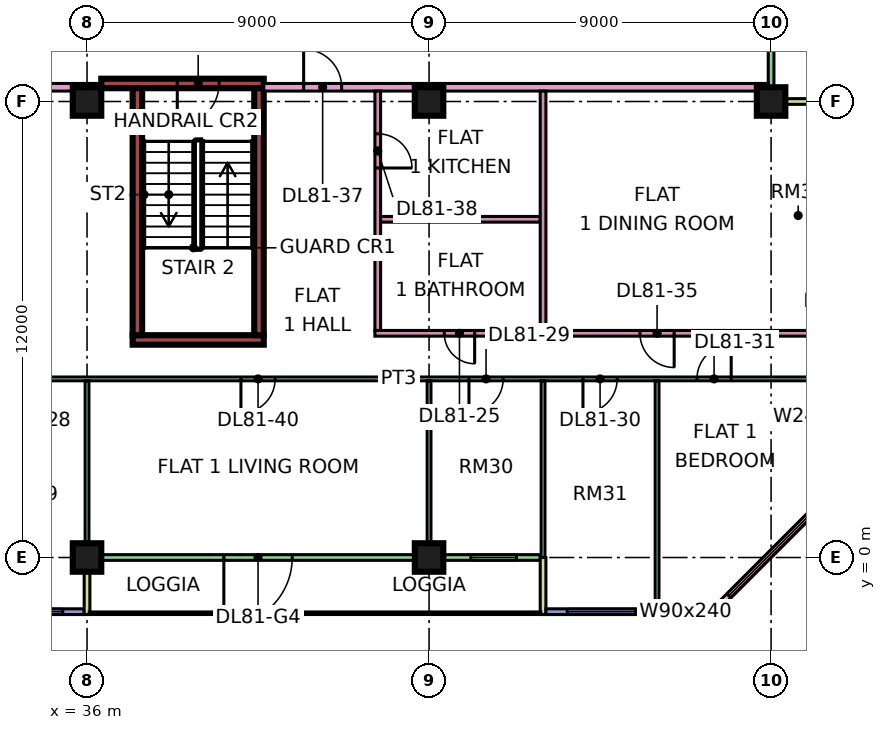
"""IFC4 building model, lengths in metres.
Left out: names, types, materials, properties, quantities, classifications, styles, units other than length and angle.
Written with IfcOpenShell. Run it as: python <this file> out.ifc"""

import sys

from ifc_helpers import new_model, si_unit, direction, frame, frame_2d, origin, origin_2d, place, context, subcontext, project, spatial, rectangle, extrude, element, fill, save


model = new_model("IFC4")
c1 = context("Model", 3, precision=1e-05, world=origin(), true_north=direction((0.0, 1.0)))
c2 = subcontext(c1, "Body", "Model", "MODEL_VIEW")
j1 = project(units=[si_unit("LENGTHUNIT", "METRE"), si_unit("PLANEANGLEUNIT", "RADIAN")], contexts=[c1])
p1 = place(None, origin())
s1 = spatial("IfcSite", under=j1, at=p1, CompositionType="ELEMENT")
p2 = place(p1, origin())
s2 = spatial("IfcBuilding", under=s1, at=p2, CompositionType="ELEMENT")
p3 = place(p2, frame((0.0, 0.0, 350.15)))
s3 = spatial("IfcBuildingStorey", under=s2, at=p3, CompositionType="ELEMENT", Elevation=350.15)
for number, where, z_axis, x_axis in (
    (1, (36.0, 0.0, 0.0), (0.0, 0.0, 1.0), (1.0, 0.0, 0.0)),
    (2, (36.0, 12.0, 0.0), (0.0, 0.0, 1.0), (1.0, 0.0, 0.0)),
    (3, (45.0, 0.0, 0.0), (0.0, 0.0, 1.0), (1.0, 0.0, 0.0)),
    (4, (45.0, 12.0, 0.0), (0.0, 0.0, 1.0), (1.0, 0.0, 0.0)),
    (5, (54.0, 12.0, 0.0), (0.0, 0.0, 1.0), (1.0, 0.0, 0.0)),
):
    element("IfcColumn", number, at=place(p3, frame(where, z_axis=z_axis, x_axis=x_axis)), inside=s3, PredefinedType="COLUMN", context=c2, shape_type="SweptSolid", body=[
        extrude(rectangle(XDim=0.75, YDim=0.75, at=origin_2d()), origin(), (0.0, 0.0, 1.0), 3.75),
    ])
p4 = place(p3, frame((37.2, 5.725, 0.0), z_axis=(0.0, 0.0, 1.0), x_axis=(1.0, 0.0, 0.0)))
e6 = element("IfcWall", 6, at=p4, inside=s3, PredefinedType="SHEAR", context=c2, shape_type="SweptSolid", body=[
    extrude(rectangle(XDim=3.45, YDim=0.25, at=frame_2d((1.725, 0.0))), origin(), (0.0, 0.0, 1.0), 3.75),
])
p5 = place(p3, frame((36.375, 12.475, 0.0), z_axis=(0.0, 0.0, 1.0), x_axis=(1.0, 0.0, 0.0)))
e7 = element("IfcWall", 7, at=p5, inside=s3, PredefinedType="SHEAR", context=c2, shape_type="SweptSolid", body=[
    extrude(rectangle(XDim=4.275, YDim=0.25, at=frame_2d((2.137, 0.0))), origin(), (0.0, 0.0, 1.0), 3.75),
])
p6 = place(p5, frame((2.0, 0.0, 0.0)))
e8 = element("IfcOpeningElement", 8, at=p6, cuts=e7, PredefinedType="OPENING", context=c2, shape_type="SweptSolid", body=[
    extrude(rectangle(XDim=1.1, YDim=2.2, at=frame_2d((0.55, 1.1))), frame((0.0, 0.135, 0.0), z_axis=(0.0, -1.0, 0.0), x_axis=(1.0, 0.0, 0.0)), (0.0, 0.0, 1.0), 0.27),
])
for number, where, z_axis, x_axis in (
    (9, (37.325, 5.85, 0.0), (0.0, 0.0, 1.0), (0.0, 1.0, 0.0)),
    (10, (40.525, 5.85, 0.0), (0.0, 0.0, 1.0), (0.0, 1.0, 0.0)),
):
    element("IfcWall", number, at=place(p3, frame(where, z_axis=z_axis, x_axis=x_axis)), inside=s3, PredefinedType="SHEAR", context=c2, shape_type="SweptSolid", body=[
        extrude(rectangle(XDim=6.5, YDim=0.25, at=frame_2d((3.25, 0.0))), origin(), (0.0, 0.0, 1.0), 3.75),
    ])
p7 = place(p3, frame((24.075, -1.425, 0.0), z_axis=(0.0, 0.0, 1.0), x_axis=(1.0, 0.0, 0.0)))
e11 = element("IfcWall", 11, at=p7, inside=s3, PredefinedType="SOLIDWALL", context=c2, shape_type="SweptSolid", body=[
    extrude(rectangle(XDim=11.85, YDim=0.15, at=frame_2d((5.925, 0.0))), origin(), (0.0, 0.0, 1.0), 3.35),
])
p8 = place(p7, frame((0.562, 0.0, 0.45)))
e12 = element("IfcOpeningElement", 12, at=p8, cuts=e11, PredefinedType="OPENING", context=c2, shape_type="SweptSolid", body=[
    extrude(rectangle(XDim=1.8, YDim=2.4, at=frame_2d((0.9, 1.2))), frame((0.0, 0.085, 0.0), z_axis=(0.0, -1.0, 0.0), x_axis=(1.0, 0.0, 0.0)), (0.0, 0.0, 1.0), 0.17),
])
p9 = place(p7, frame((3.525, 0.0, 0.45)))
e13 = element("IfcOpeningElement", 13, at=p9, cuts=e11, PredefinedType="OPENING", context=c2, shape_type="SweptSolid", body=[
    extrude(rectangle(XDim=1.8, YDim=2.4, at=frame_2d((0.9, 1.2))), frame((0.0, 0.085, 0.0), z_axis=(0.0, -1.0, 0.0), x_axis=(1.0, 0.0, 0.0)), (0.0, 0.0, 1.0), 0.17),
])
p10 = place(p7, frame((6.525, 0.0, 0.45)))
e14 = element("IfcOpeningElement", 14, at=p10, cuts=e11, PredefinedType="OPENING", context=c2, shape_type="SweptSolid", body=[
    extrude(rectangle(XDim=1.8, YDim=2.4, at=frame_2d((0.9, 1.2))), frame((0.0, 0.085, 0.0), z_axis=(0.0, -1.0, 0.0), x_axis=(1.0, 0.0, 0.0)), (0.0, 0.0, 1.0), 0.17),
])
p11 = place(p7, frame((9.488, 0.0, 0.45)))
e15 = element("IfcOpeningElement", 15, at=p11, cuts=e11, PredefinedType="OPENING", context=c2, shape_type="SweptSolid", body=[
    extrude(rectangle(XDim=1.8, YDim=2.4, at=frame_2d((0.9, 1.2))), frame((0.0, 0.085, 0.0), z_axis=(0.0, -1.0, 0.0), x_axis=(1.0, 0.0, 0.0)), (0.0, 0.0, 1.0), 0.17),
])
p12 = place(p3, frame((36.075, 0.0, 0.0), z_axis=(0.0, 0.0, 1.0), x_axis=(1.0, 0.0, 0.0)))
e16 = element("IfcWall", 16, at=p12, inside=s3, PredefinedType="SOLIDWALL", context=c2, shape_type="SweptSolid", body=[
    extrude(rectangle(XDim=11.85, YDim=0.15, at=frame_2d((5.925, 0.0))), origin(), (0.0, 0.0, 1.0), 3.35),
])
p13 = place(p12, frame((3.525, 0.0, 0.0)))
e17 = element("IfcOpeningElement", 17, at=p13, cuts=e16, PredefinedType="OPENING", context=c2, shape_type="SweptSolid", body=[
    extrude(rectangle(XDim=1.8, YDim=2.4, at=frame_2d((0.9, 1.2))), frame((0.0, 0.085, 0.0), z_axis=(0.0, -1.0, 0.0), x_axis=(1.0, 0.0, 0.0)), (0.0, 0.0, 1.0), 0.17),
])
p14 = place(p12, frame((10.025, 0.0, 0.45)))
e18 = element("IfcOpeningElement", 18, at=p14, cuts=e16, PredefinedType="OPENING", context=c2, shape_type="SweptSolid", body=[
    extrude(rectangle(XDim=1.2, YDim=2.4, at=frame_2d((0.6, 1.2))), frame((0.0, 0.085, 0.0), z_axis=(0.0, -1.0, 0.0), x_axis=(1.0, 0.0, 0.0)), (0.0, 0.0, 1.0), 0.17),
])
for number, where, z_axis, x_axis in (
    (19, (36.0, -1.5, 0.0), (0.0, 0.0, 1.0), (0.0, 1.0, 0.0)),
    (20, (48.0, -1.5, 0.0), (0.0, 0.0, 1.0), (0.0, 1.0, 0.0)),
):
    element("IfcWall", number, at=place(p3, frame(where, z_axis=z_axis, x_axis=x_axis)), inside=s3, PredefinedType="SOLIDWALL", context=c2, shape_type="SweptSolid", body=[
        extrude(rectangle(XDim=1.5, YDim=0.15, at=frame_2d((0.75, 0.0))), origin(), (0.0, 0.0, 1.0), 3.35),
    ])
p15 = place(p3, frame((48.075, -1.425, 0.0), z_axis=(0.0, 0.0, 1.0), x_axis=(1.0, 0.0, 0.0)))
e21 = element("IfcWall", 21, at=p15, inside=s3, PredefinedType="SOLIDWALL", context=c2, shape_type="SweptSolid", body=[
    extrude(rectangle(XDim=4.425, YDim=0.15, at=frame_2d((2.212, 0.0))), origin(), (0.0, 0.0, 1.0), 3.35),
])
p16 = place(p15, frame((0.562, 0.0, 0.45)))
e22 = element("IfcOpeningElement", 22, at=p16, cuts=e21, PredefinedType="OPENING", context=c2, shape_type="SweptSolid", body=[
    extrude(rectangle(XDim=1.8, YDim=2.4, at=frame_2d((0.9, 1.2))), frame((0.0, 0.085, 0.0), z_axis=(0.0, -1.0, 0.0), x_axis=(1.0, 0.0, 0.0)), (0.0, 0.0, 1.0), 0.17),
])
p17 = place(p15, frame((3.225, 0.0, 0.45)))
e23 = element("IfcOpeningElement", 23, at=p17, cuts=e21, PredefinedType="OPENING", context=c2, shape_type="SweptSolid", body=[
    extrude(rectangle(XDim=0.9, YDim=2.4, at=frame_2d((0.45, 1.2))), frame((0.0, 0.085, 0.0), z_axis=(0.0, -1.0, 0.0), x_axis=(1.0, 0.0, 0.0)), (0.0, 0.0, 1.0), 0.17),
])
p18 = place(p3, frame((52.447, -1.447, 0.0), z_axis=(0.0, 0.0, 1.0), x_axis=(0.707106781187, 0.707106781187, 0.0)))
e24 = element("IfcWall", 24, at=p18, inside=s3, PredefinedType="SOLIDWALL", context=c2, shape_type="SweptSolid", body=[
    extrude(rectangle(XDim=4.243, YDim=0.15, at=frame_2d((2.121, 0.0))), origin(), (0.0, 0.0, 1.0), 3.35),
])
p19 = place(p18, frame((0.621, 0.0, 0.45)))
e25 = element("IfcOpeningElement", 25, at=p19, cuts=e24, PredefinedType="OPENING", context=c2, shape_type="SweptSolid", body=[
    extrude(rectangle(XDim=3.0, YDim=2.4, at=frame_2d((1.5, 1.2))), frame((0.0, 0.085, 0.0), z_axis=(0.0, -1.0, 0.0), x_axis=(1.0, 0.0, 0.0)), (0.0, 0.0, 1.0), 0.17),
])
p20 = place(p3, frame((54.0, 12.075, 0.0), z_axis=(0.0, 0.0, 1.0), x_axis=(0.0, 1.0, 0.0)))
e26 = element("IfcWall", 26, at=p20, inside=s3, PredefinedType="SOLIDWALL", context=c2, shape_type="SweptSolid", body=[
    extrude(rectangle(XDim=10.35, YDim=0.15, at=frame_2d((5.175, 0.0))), origin(), (0.0, 0.0, 1.0), 3.35),
])
p21 = place(p20, frame((4.538, 0.0, 0.45)))
e27 = element("IfcOpeningElement", 27, at=p21, cuts=e26, PredefinedType="OPENING", context=c2, shape_type="SweptSolid", body=[
    extrude(rectangle(XDim=4.8, YDim=2.4, at=frame_2d((2.4, 1.2))), frame((0.0, 0.085, 0.0), z_axis=(0.0, -1.0, 0.0), x_axis=(1.0, 0.0, 0.0)), (0.0, 0.0, 1.0), 0.17),
])
p22 = place(p3, frame((55.5, 12.0, 0.0), z_axis=(0.0, 0.0, 1.0), x_axis=(-1.0, 0.0, 0.0)))
e28 = element("IfcWall", 28, at=p22, inside=s3, PredefinedType="SOLIDWALL", context=c2, shape_type="SweptSolid", body=[
    extrude(rectangle(XDim=1.5, YDim=0.15, at=frame_2d((0.75, 0.0))), origin(), (0.0, 0.0, 1.0), 3.35),
])
p23 = place(p3, frame((33.05, 4.7, 0.0), z_axis=(0.0, 0.0, 1.0), x_axis=(1.0, 0.0, 0.0)))
e29 = element("IfcWall", 29, at=p23, inside=s3, PredefinedType="PARTITIONING", context=c2, shape_type="SweptSolid", body=[
    extrude(rectangle(XDim=22.301, YDim=0.1, at=frame_2d((11.15, 0.0))), origin(), (0.0, 0.0, 1.0), 3.35),
])
p24 = place(p23, frame((1.0, 0.0, 0.0)))
e30 = element("IfcOpeningElement", 30, at=p24, cuts=e29, PredefinedType="OPENING", context=c2, shape_type="SweptSolid", body=[
    extrude(rectangle(XDim=0.9, YDim=2.1, at=frame_2d((0.45, 1.05))), frame((0.0, 0.06, 0.0), z_axis=(0.0, -1.0, 0.0), x_axis=(1.0, 0.0, 0.0)), (0.0, 0.0, 1.0), 0.12),
])
p25 = place(p23, frame((13.0, 0.0, 0.0)))
e31 = element("IfcOpeningElement", 31, at=p25, cuts=e29, PredefinedType="OPENING", context=c2, shape_type="SweptSolid", body=[
    extrude(rectangle(XDim=0.9, YDim=2.1, at=frame_2d((0.45, 1.05))), frame((0.0, 0.06, 0.0), z_axis=(0.0, -1.0, 0.0), x_axis=(1.0, 0.0, 0.0)), (0.0, 0.0, 1.0), 0.12),
])
p26 = place(p23, frame((16.0, 0.0, 0.0)))
e32 = element("IfcOpeningElement", 32, at=p26, cuts=e29, PredefinedType="OPENING", context=c2, shape_type="SweptSolid", body=[
    extrude(rectangle(XDim=0.9, YDim=2.1, at=frame_2d((0.45, 1.05))), frame((0.0, 0.06, 0.0), z_axis=(0.0, -1.0, 0.0), x_axis=(1.0, 0.0, 0.0)), (0.0, 0.0, 1.0), 0.12),
])
p27 = place(p23, frame((19.0, 0.0, 0.0)))
e33 = element("IfcOpeningElement", 33, at=p27, cuts=e29, PredefinedType="OPENING", context=c2, shape_type="SweptSolid", body=[
    extrude(rectangle(XDim=0.9, YDim=2.1, at=frame_2d((0.45, 1.05))), frame((0.0, 0.06, 0.0), z_axis=(0.0, -1.0, 0.0), x_axis=(1.0, 0.0, 0.0)), (0.0, 0.0, 1.0), 0.12),
])
p28 = place(p23, frame((7.0, 0.0, 0.0)))
e34 = element("IfcOpeningElement", 34, at=p28, cuts=e29, PredefinedType="OPENING", context=c2, shape_type="SweptSolid", body=[
    extrude(rectangle(XDim=0.9, YDim=2.1, at=frame_2d((0.45, 1.05))), frame((0.0, 0.06, 0.0), z_axis=(0.0, -1.0, 0.0), x_axis=(1.0, 0.0, 0.0)), (0.0, 0.0, 1.0), 0.12),
])
p29 = place(p3, frame((34.0, 12.375, 0.0), z_axis=(0.0, 0.0, 1.0), x_axis=(1.0, 0.0, 0.0)))
e35 = element("IfcWall", 35, at=p29, inside=s3, PredefinedType="PARTITIONING", context=c2, shape_type="SweptSolid", body=[
    extrude(rectangle(XDim=2.376, YDim=0.2, at=frame_2d((1.188, 0.0))), origin(), (0.0, 0.0, 1.0), 3.35),
])
p30 = place(p3, frame((36.0, 0.0, 0.0), z_axis=(0.0, 0.0, 1.0), x_axis=(0.0, 1.0, 0.0)))
e36 = element("IfcWall", 36, at=p30, inside=s3, PredefinedType="PARTITIONING", context=c2, shape_type="SweptSolid", body=[
    extrude(rectangle(XDim=4.65, YDim=0.1, at=frame_2d((2.325, 0.0))), origin(), (0.0, 0.0, 1.0), 3.35),
])
p31 = place(p3, frame((40.65, 12.375, 0.0), z_axis=(0.0, 0.0, 1.0), x_axis=(1.0, 0.0, 0.0)))
e37 = element("IfcWall", 37, at=p31, inside=s3, PredefinedType="PARTITIONING", context=c2, shape_type="SweptSolid", body=[
    extrude(rectangle(XDim=13.276, YDim=0.2, at=frame_2d((6.638, 0.0))), origin(), (0.0, 0.0, 1.0), 3.35),
])
p32 = place(p31, frame((1.05, 0.0, 0.0)))
e38 = element("IfcOpeningElement", 38, at=p32, cuts=e37, PredefinedType="OPENING", context=c2, shape_type="SweptSolid", body=[
    extrude(rectangle(XDim=1.0, YDim=2.1, at=frame_2d((0.5, 1.05))), frame((0.0, 0.11, 0.0), z_axis=(0.0, -1.0, 0.0), x_axis=(1.0, 0.0, 0.0)), (0.0, 0.0, 1.0), 0.22),
])
p33 = place(p3, frame((43.575, 5.9, 0.0), z_axis=(0.0, 0.0, 1.0), x_axis=(1.0, 0.0, 0.0)))
e39 = element("IfcWall", 39, at=p33, inside=s3, PredefinedType="PARTITIONING", context=c2, shape_type="SweptSolid", body=[
    extrude(rectangle(XDim=11.775, YDim=0.15, at=frame_2d((5.888, 0.0))), origin(), (0.0, 0.0, 1.0), 3.35),
])
p34 = place(p33, frame((1.825, 0.0, 0.0)))
e40 = element("IfcOpeningElement", 40, at=p34, cuts=e39, PredefinedType="OPENING", context=c2, shape_type="SweptSolid", body=[
    extrude(rectangle(XDim=0.8, YDim=2.1, at=frame_2d((0.4, 1.05))), frame((0.0, 0.085, 0.0), z_axis=(0.0, -1.0, 0.0), x_axis=(1.0, 0.0, 0.0)), (0.0, 0.0, 1.0), 0.17),
])
p35 = place(p33, frame((6.975, 0.0, 0.0)))
e41 = element("IfcOpeningElement", 41, at=p35, cuts=e39, PredefinedType="OPENING", context=c2, shape_type="SweptSolid", body=[
    extrude(rectangle(XDim=0.9, YDim=2.1, at=frame_2d((0.45, 1.05))), frame((0.0, 0.085, 0.0), z_axis=(0.0, -1.0, 0.0), x_axis=(1.0, 0.0, 0.0)), (0.0, 0.0, 1.0), 0.17),
])
p36 = place(p3, frame((43.65, 5.975, 0.0), z_axis=(0.0, 0.0, 1.0), x_axis=(0.0, 1.0, 0.0)))
e42 = element("IfcWall", 42, at=p36, inside=s3, PredefinedType="PARTITIONING", context=c2, shape_type="SweptSolid", body=[
    extrude(rectangle(XDim=6.3, YDim=0.15, at=frame_2d((3.15, 0.0))), origin(), (0.0, 0.0, 1.0), 3.35),
])
p37 = place(p36, frame((4.275, 0.0, 0.0)))
e43 = element("IfcOpeningElement", 43, at=p37, cuts=e42, PredefinedType="OPENING", context=c2, shape_type="SweptSolid", body=[
    extrude(rectangle(XDim=0.9, YDim=2.1, at=frame_2d((0.45, 1.05))), frame((0.0, 0.085, 0.0), z_axis=(0.0, -1.0, 0.0), x_axis=(1.0, 0.0, 0.0)), (0.0, 0.0, 1.0), 0.17),
])
p38 = place(p3, frame((43.725, 8.9, 0.0), z_axis=(0.0, 0.0, 1.0), x_axis=(1.0, 0.0, 0.0)))
e44 = element("IfcWall", 44, at=p38, inside=s3, PredefinedType="PARTITIONING", context=c2, shape_type="SweptSolid", body=[
    extrude(rectangle(XDim=4.2, YDim=0.15, at=frame_2d((2.1, 0.0))), origin(), (0.0, 0.0, 1.0), 3.35),
])
p39 = place(p3, frame((45.0, 0.074, 0.0), z_axis=(0.0, 0.0, 1.0), x_axis=(0.0, 1.0, 0.0)))
e45 = element("IfcWall", 45, at=p39, inside=s3, PredefinedType="PARTITIONING", context=c2, shape_type="SweptSolid", body=[
    extrude(rectangle(XDim=4.576, YDim=0.1, at=frame_2d((2.288, 0.0))), origin(), (0.0, 0.0, 1.0), 3.35),
])
p40 = place(p3, frame((48.0, 0.0, 0.0), z_axis=(0.0, 0.0, 1.0), x_axis=(0.0, 1.0, 0.0)))
e46 = element("IfcWall", 46, at=p40, inside=s3, PredefinedType="PARTITIONING", context=c2, shape_type="SweptSolid", body=[
    extrude(rectangle(XDim=4.65, YDim=0.1, at=frame_2d((2.325, 0.0))), origin(), (0.0, 0.0, 1.0), 3.35),
])
p41 = place(p3, frame((48.0, 5.975, 0.0), z_axis=(0.0, 0.0, 1.0), x_axis=(0.0, 1.0, 0.0)))
e47 = element("IfcWall", 47, at=p41, inside=s3, PredefinedType="PARTITIONING", context=c2, shape_type="SweptSolid", body=[
    extrude(rectangle(XDim=6.3, YDim=0.15, at=frame_2d((3.15, 0.0))), origin(), (0.0, 0.0, 1.0), 3.35),
])
p42 = place(p3, frame((51.0, -1.351, 0.0), z_axis=(0.0, 0.0, 1.0), x_axis=(0.0, 1.0, 0.0)))
e48 = element("IfcWall", 48, at=p42, inside=s3, PredefinedType="PARTITIONING", context=c2, shape_type="SweptSolid", body=[
    extrude(rectangle(XDim=6.001, YDim=0.1, at=frame_2d((3.0, 0.0))), origin(), (0.0, 0.0, 1.0), 3.35),
])
p43 = place(p11, origin())
e49 = element("IfcWindow", 49, at=p43, inside=s3, PartitioningType="SINGLE_PANEL", PredefinedType="WINDOW", context=c2, shape_type="SweptSolid", body=[
    extrude(rectangle(XDim=1.8, YDim=2.4, at=frame_2d((0.9, 1.2))), frame((0.0, 0.03, 0.0), z_axis=(0.0, -1.0, 0.0), x_axis=(1.0, 0.0, 0.0)), (0.0, 0.0, 1.0), 0.06),
])
fill(e15, e49)
p44 = place(p13, frame((1.8, 0.0, 0.0), z_axis=(0.0, 0.0, 1.0), x_axis=(-1.0, 0.0, 0.0)))
e50 = element("IfcDoor", 50, at=p44, inside=s3, OperationType="DOUBLE_DOOR_SINGLE_SWING", PredefinedType="DOOR", context=c2, shape_type="SweptSolid", body=[
    extrude(rectangle(XDim=1.8, YDim=2.4, at=frame_2d((0.9, 1.2))), frame((0.0, 0.025, 0.0), z_axis=(0.0, -1.0, 0.0), x_axis=(1.0, 0.0, 0.0)), (0.0, 0.0, 1.0), 0.05),
])
fill(e17, e50)
p45 = place(p14, origin())
e51 = element("IfcWindow", 51, at=p45, inside=s3, PartitioningType="SINGLE_PANEL", PredefinedType="WINDOW", context=c2, shape_type="SweptSolid", body=[
    extrude(rectangle(XDim=1.2, YDim=2.4, at=frame_2d((0.6, 1.2))), frame((0.0, 0.03, 0.0), z_axis=(0.0, -1.0, 0.0), x_axis=(1.0, 0.0, 0.0)), (0.0, 0.0, 1.0), 0.06),
])
fill(e18, e51)
p46 = place(p16, origin())
e52 = element("IfcWindow", 52, at=p46, inside=s3, PartitioningType="SINGLE_PANEL", PredefinedType="WINDOW", context=c2, shape_type="SweptSolid", body=[
    extrude(rectangle(XDim=1.8, YDim=2.4, at=frame_2d((0.9, 1.2))), frame((0.0, 0.03, 0.0), z_axis=(0.0, -1.0, 0.0), x_axis=(1.0, 0.0, 0.0)), (0.0, 0.0, 1.0), 0.06),
])
fill(e22, e52)
p47 = place(p17, origin())
e53 = element("IfcWindow", 53, at=p47, inside=s3, PartitioningType="SINGLE_PANEL", PredefinedType="WINDOW", context=c2, shape_type="SweptSolid", body=[
    extrude(rectangle(XDim=0.9, YDim=2.4, at=frame_2d((0.45, 1.2))), frame((0.0, 0.03, 0.0), z_axis=(0.0, -1.0, 0.0), x_axis=(1.0, 0.0, 0.0)), (0.0, 0.0, 1.0), 0.06),
])
fill(e23, e53)
p48 = place(p19, origin())
e54 = element("IfcWindow", 54, at=p48, inside=s3, PartitioningType="SINGLE_PANEL", PredefinedType="WINDOW", context=c2, shape_type="SweptSolid", body=[
    extrude(rectangle(XDim=3.0, YDim=2.4, at=frame_2d((1.5, 1.2))), frame((0.0, 0.03, 0.0), z_axis=(0.0, -1.0, 0.0), x_axis=(1.0, 0.0, 0.0)), (0.0, 0.0, 1.0), 0.06),
])
fill(e25, e54)
p49 = place(p6, frame((1.1, 0.0, 0.0), z_axis=(0.0, 0.0, 1.0), x_axis=(-1.0, 0.0, 0.0)))
e55 = element("IfcDoor", 55, at=p49, inside=s3, OperationType="SINGLE_SWING_LEFT", PredefinedType="DOOR", context=c2, shape_type="SweptSolid", body=[
    extrude(rectangle(XDim=1.1, YDim=2.2, at=frame_2d((0.55, 1.1))), frame((0.0, 0.025, 0.0), z_axis=(0.0, -1.0, 0.0), x_axis=(1.0, 0.0, 0.0)), (0.0, 0.0, 1.0), 0.05),
])
fill(e8, e55)
p50 = place(p34, origin())
e56 = element("IfcDoor", 56, at=p50, inside=s3, OperationType="SINGLE_SWING_RIGHT", PredefinedType="DOOR", context=c2, shape_type="SweptSolid", body=[
    extrude(rectangle(XDim=0.8, YDim=2.1, at=frame_2d((0.4, 1.05))), frame((0.0, 0.025, 0.0), z_axis=(0.0, -1.0, 0.0), x_axis=(1.0, 0.0, 0.0)), (0.0, 0.0, 1.0), 0.05),
])
fill(e40, e56)
p51 = place(p25, frame((0.9, 0.0, 0.0), z_axis=(0.0, 0.0, 1.0), x_axis=(-1.0, 0.0, 0.0)))
e57 = element("IfcDoor", 57, at=p51, inside=s3, OperationType="SINGLE_SWING_LEFT", PredefinedType="DOOR", context=c2, shape_type="SweptSolid", body=[
    extrude(rectangle(XDim=0.9, YDim=2.1, at=frame_2d((0.45, 1.05))), frame((0.0, 0.025, 0.0), z_axis=(0.0, -1.0, 0.0), x_axis=(1.0, 0.0, 0.0)), (0.0, 0.0, 1.0), 0.05),
])
fill(e31, e57)
p52 = place(p26, frame((0.9, 0.0, 0.0), z_axis=(0.0, 0.0, 1.0), x_axis=(-1.0, 0.0, 0.0)))
e58 = element("IfcDoor", 58, at=p52, inside=s3, OperationType="SINGLE_SWING_LEFT", PredefinedType="DOOR", context=c2, shape_type="SweptSolid", body=[
    extrude(rectangle(XDim=0.9, YDim=2.1, at=frame_2d((0.45, 1.05))), frame((0.0, 0.025, 0.0), z_axis=(0.0, -1.0, 0.0), x_axis=(1.0, 0.0, 0.0)), (0.0, 0.0, 1.0), 0.05),
])
fill(e32, e58)
p53 = place(p27, frame((0.9, 0.0, 0.0), z_axis=(0.0, 0.0, 1.0), x_axis=(-1.0, 0.0, 0.0)))
e59 = element("IfcDoor", 59, at=p53, inside=s3, OperationType="SINGLE_SWING_RIGHT", PredefinedType="DOOR", context=c2, shape_type="SweptSolid", body=[
    extrude(rectangle(XDim=0.9, YDim=2.1, at=frame_2d((0.45, 1.05))), frame((0.0, 0.025, 0.0), z_axis=(0.0, -1.0, 0.0), x_axis=(1.0, 0.0, 0.0)), (0.0, 0.0, 1.0), 0.05),
])
fill(e33, e59)
p54 = place(p35, origin())
e60 = element("IfcDoor", 60, at=p54, inside=s3, OperationType="SINGLE_SWING_RIGHT", PredefinedType="DOOR", context=c2, shape_type="SweptSolid", body=[
    extrude(rectangle(XDim=0.9, YDim=2.1, at=frame_2d((0.45, 1.05))), frame((0.0, 0.025, 0.0), z_axis=(0.0, -1.0, 0.0), x_axis=(1.0, 0.0, 0.0)), (0.0, 0.0, 1.0), 0.05),
])
fill(e41, e60)
p55 = place(p32, origin())
e61 = element("IfcDoor", 61, at=p55, inside=s3, OperationType="SINGLE_SWING_LEFT", PredefinedType="DOOR", context=c2, shape_type="SweptSolid", body=[
    extrude(rectangle(XDim=1.0, YDim=2.1, at=frame_2d((0.5, 1.05))), frame((0.0, 0.025, 0.0), z_axis=(0.0, -1.0, 0.0), x_axis=(1.0, 0.0, 0.0)), (0.0, 0.0, 1.0), 0.05),
])
fill(e38, e61)
p56 = place(p37, frame((0.9, 0.0, 0.0), z_axis=(0.0, 0.0, 1.0), x_axis=(-1.0, 0.0, 0.0)))
e62 = element("IfcDoor", 62, at=p56, inside=s3, OperationType="SINGLE_SWING_LEFT", PredefinedType="DOOR", context=c2, shape_type="SweptSolid", body=[
    extrude(rectangle(XDim=0.9, YDim=2.1, at=frame_2d((0.45, 1.05))), frame((0.0, 0.025, 0.0), z_axis=(0.0, -1.0, 0.0), x_axis=(1.0, 0.0, 0.0)), (0.0, 0.0, 1.0), 0.05),
])
fill(e43, e62)
p57 = place(p28, frame((0.9, 0.0, 0.0), z_axis=(0.0, 0.0, 1.0), x_axis=(-1.0, 0.0, 0.0)))
e63 = element("IfcDoor", 63, at=p57, inside=s3, OperationType="SINGLE_SWING_LEFT", PredefinedType="DOOR", context=c2, shape_type="SweptSolid", body=[
    extrude(rectangle(XDim=0.9, YDim=2.1, at=frame_2d((0.45, 1.05))), frame((0.0, 0.025, 0.0), z_axis=(0.0, -1.0, 0.0), x_axis=(1.0, 0.0, 0.0)), (0.0, 0.0, 1.0), 0.05),
])
fill(e34, e63)
save(model, sys.argv[1])
